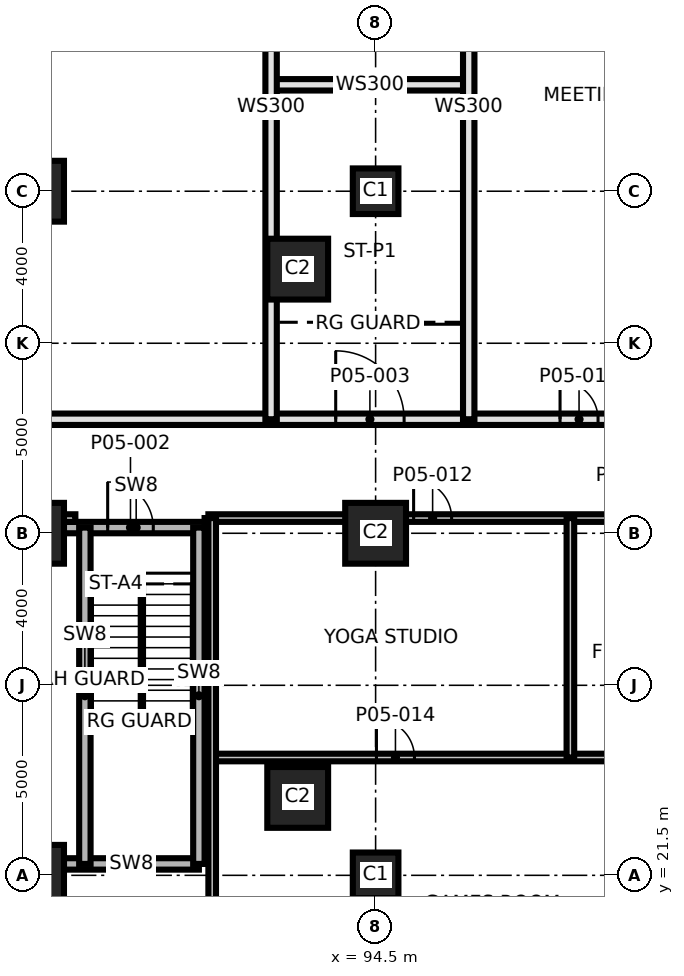
"""IFC4 building model, lengths in metres.
Left out: names, types, materials, properties, quantities, classifications, styles, units other than length and angle.
Written with IfcOpenShell. Run it as: python <this file> out.ifc"""

import sys

from ifc_helpers import new_model, si_unit, direction, frame, frame_2d, origin, origin_2d, place, context, subcontext, project, spatial, rectangle, extrude, element, fill, save


model = new_model("IFC4")
c1 = context("Model", 3, precision=1e-05, world=origin(), true_north=direction((0.0, 1.0)))
c2 = subcontext(c1, "Body", "Model", "MODEL_VIEW")
j1 = project(units=[si_unit("LENGTHUNIT", "METRE"), si_unit("PLANEANGLEUNIT", "RADIAN")], contexts=[c1])
p1 = place(None, origin())
s1 = spatial("IfcSite", under=j1, at=p1, CompositionType="ELEMENT")
p2 = place(p1, origin())
s2 = spatial("IfcBuilding", under=s1, at=p2, CompositionType="ELEMENT")
p3 = place(p2, frame((0.0, 0.0, 28.5)))
s3 = spatial("IfcBuildingStorey", under=s2, at=p3, CompositionType="ELEMENT", Elevation=28.5)
p4 = place(p3, frame((85.5, 21.5, 0.0), z_axis=(0.0, 0.0, 1.0), x_axis=(1.0, 0.0, 0.0)))
e1 = element("IfcColumn", 1, at=p4, inside=s3, PredefinedType="COLUMN", context=c2, shape_type="SweptSolid", body=[
    extrude(rectangle(XDim=1.6, YDim=1.6, at=origin_2d()), origin(), (0.0, 0.0, 1.0), 5.0),
])
p5 = place(p3, frame((94.5, 21.5, 0.0), z_axis=(0.0, 0.0, 1.0), x_axis=(1.0, 0.0, 0.0)))
e2 = element("IfcColumn", 2, at=p5, inside=s3, PredefinedType="COLUMN", context=c2, shape_type="SweptSolid", body=[
    extrude(rectangle(XDim=1.2, YDim=1.2, at=origin_2d()), origin(), (0.0, 0.0, 1.0), 5.0),
])
for number, where, z_axis, x_axis in (
    (3, (85.5, 30.5, 0.0), (0.0, 0.0, 1.0), (1.0, 0.0, 0.0)),
    (4, (94.5, 30.5, 0.0), (0.0, 0.0, 1.0), (1.0, 0.0, 0.0)),
    (5, (85.5, 39.5, 0.0), (0.0, 0.0, 1.0), (1.0, 0.0, 0.0)),
):
    element("IfcColumn", number, at=place(p3, frame(where, z_axis=z_axis, x_axis=x_axis)), inside=s3, PredefinedType="COLUMN", context=c2, shape_type="SweptSolid", body=[
        extrude(rectangle(XDim=1.6, YDim=1.6, at=origin_2d()), origin(), (0.0, 0.0, 1.0), 5.0),
    ])
p6 = place(p3, frame((94.5, 39.5, 0.0), z_axis=(0.0, 0.0, 1.0), x_axis=(1.0, 0.0, 0.0)))
e6 = element("IfcColumn", 6, at=p6, inside=s3, PredefinedType="COLUMN", context=c2, shape_type="SweptSolid", body=[
    extrude(rectangle(XDim=1.2, YDim=1.2, at=origin_2d()), origin(), (0.0, 0.0, 1.0), 5.0),
])
for number, where, z_axis, x_axis in (
    (7, (92.45, 23.55, 0.0), (0.0, 0.0, 1.0), (1.0, 0.0, 0.0)),
    (8, (92.45, 37.45, 0.0), (0.0, 0.0, 1.0), (1.0, 0.0, 0.0)),
):
    element("IfcColumn", number, at=place(p3, frame(where, z_axis=z_axis, x_axis=x_axis)), inside=s3, PredefinedType="COLUMN", context=c2, shape_type="SweptSolid", body=[
        extrude(rectangle(XDim=1.6, YDim=1.6, at=origin_2d()), origin(), (0.0, 0.0, 1.0), 5.0),
    ])
p7 = place(p3, frame((86.3, 21.8, 0.0), z_axis=(0.0, 0.0, 1.0), x_axis=(1.0, 0.0, 0.0)))
e9 = element("IfcWall", 9, at=p7, inside=s3, PredefinedType="SHEAR", context=c2, shape_type="SweptSolid", body=[
    extrude(rectangle(XDim=3.55, YDim=0.3, at=frame_2d((1.775, 0.0))), origin(), (0.0, 0.0, 1.0), 4.7),
])
p8 = place(p3, frame((90.2, 24.6, 0.0), z_axis=(0.0, 0.0, 1.0), x_axis=(1.0, 0.0, 0.0)))
e10 = element("IfcWall", 10, at=p8, inside=s3, PredefinedType="PARTITIONING", context=c2, shape_type="SweptSolid", body=[
    extrude(rectangle(XDim=14.73, YDim=0.2, at=frame_2d((7.365, 0.0))), origin(), (0.0, 0.0, 1.0), 4.7),
])
p9 = place(p8, frame((4.322, 0.0, 0.0)))
e11 = element("IfcOpeningElement", 11, at=p9, cuts=e10, PredefinedType="OPENING", context=c2, shape_type="SweptSolid", body=[
    extrude(rectangle(XDim=1.0, YDim=2.1, at=frame_2d((0.5, 1.05))), frame((0.0, 0.11, 0.0), z_axis=(0.0, -1.0, 0.0), x_axis=(1.0, 0.0, 0.0)), (0.0, 0.0, 1.0), 0.22),
])
p10 = place(p3, frame((86.3, 30.65, 0.0), z_axis=(0.0, 0.0, 1.0), x_axis=(1.0, 0.0, 0.0)))
e12 = element("IfcWall", 12, at=p10, inside=s3, PredefinedType="SHEAR", context=c2, shape_type="SweptSolid", body=[
    extrude(rectangle(XDim=3.8, YDim=0.3, at=frame_2d((1.9, 0.0))), origin(), (0.0, 0.0, 1.0), 4.7),
])
p11 = place(p10, frame((1.15, 0.0, 0.0)))
e13 = element("IfcOpeningElement", 13, at=p11, cuts=e12, PredefinedType="OPENING", context=c2, shape_type="SweptSolid", body=[
    extrude(rectangle(XDim=1.2, YDim=2.1, at=frame_2d((0.6, 1.05))), frame((0.0, 0.16, 0.0), z_axis=(0.0, -1.0, 0.0), x_axis=(1.0, 0.0, 0.0)), (0.0, 0.0, 1.0), 0.32),
])
p12 = place(p3, frame((84.6, 30.9, 0.0), z_axis=(0.0, 0.0, 1.0), x_axis=(1.0, 0.0, 0.0)))
e14 = element("IfcWall", 14, at=p12, inside=s3, PredefinedType="PARTITIONING", context=c2, shape_type="SweptSolid", body=[
    extrude(rectangle(XDim=2.0, YDim=0.2, at=frame_2d((1.0, 0.0))), origin(), (0.0, 0.0, 1.0), 4.7),
])
p13 = place(p3, frame((90.1, 30.9, 0.0), z_axis=(0.0, 0.0, 1.0), x_axis=(1.0, 0.0, 0.0)))
e15 = element("IfcWall", 15, at=p13, inside=s3, PredefinedType="PARTITIONING", context=c2, shape_type="SweptSolid", body=[
    extrude(rectangle(XDim=14.83, YDim=0.2, at=frame_2d((7.415, 0.0))), origin(), (0.0, 0.0, 1.0), 2.7),
])
p14 = place(p13, frame((5.4, 0.0, 0.0)))
e16 = element("IfcOpeningElement", 16, at=p14, cuts=e15, PredefinedType="OPENING", context=c2, shape_type="SweptSolid", body=[
    extrude(rectangle(XDim=1.0, YDim=2.1, at=frame_2d((0.5, 1.05))), frame((0.0, 0.11, 0.0), z_axis=(0.0, -1.0, 0.0), x_axis=(1.0, 0.0, 0.0)), (0.0, 0.0, 1.0), 0.22),
])
p15 = place(p13, frame((10.742, 0.0, 0.0)))
e17 = element("IfcOpeningElement", 17, at=p15, cuts=e15, PredefinedType="OPENING", context=c2, shape_type="SweptSolid", body=[
    extrude(rectangle(XDim=1.0, YDim=2.1, at=frame_2d((0.5, 1.05))), frame((0.0, 0.11, 0.0), z_axis=(0.0, -1.0, 0.0), x_axis=(1.0, 0.0, 0.0)), (0.0, 0.0, 1.0), 0.22),
])
p16 = place(p3, frame((61.5, 33.5, 0.0), z_axis=(0.0, 0.0, 1.0), x_axis=(1.0, 0.0, 0.0)))
e18 = element("IfcWall", 18, at=p16, inside=s3, PredefinedType="SOLIDWALL", context=c2, shape_type="SweptSolid", body=[
    extrude(rectangle(XDim=41.3, YDim=0.3, at=frame_2d((20.65, 0.0))), origin(), (0.0, 0.0, 1.0), 4.7),
])
p17 = place(p16, frame((31.95, 0.0, 0.0)))
e19 = element("IfcOpeningElement", 19, at=p17, cuts=e18, PredefinedType="OPENING", context=c2, shape_type="SweptSolid", body=[
    extrude(rectangle(XDim=1.8, YDim=2.1, at=frame_2d((0.9, 1.05))), frame((0.0, 0.16, 0.0), z_axis=(0.0, -1.0, 0.0), x_axis=(1.0, 0.0, 0.0)), (0.0, 0.0, 1.0), 0.32),
])
p18 = place(p16, frame((0.2, 0.0, 0.0)))
e20 = element("IfcOpeningElement", 20, at=p18, cuts=e18, PredefinedType="OPENING", context=c2, shape_type="SweptSolid", body=[
    extrude(rectangle(XDim=1.6, YDim=2.1, at=frame_2d((0.8, 1.05))), frame((0.0, 0.16, 0.0), z_axis=(0.0, -1.0, 0.0), x_axis=(1.0, 0.0, 0.0)), (0.0, 0.0, 1.0), 0.32),
])
p19 = place(p16, frame((21.144, 0.0, 0.0)))
e21 = element("IfcOpeningElement", 21, at=p19, cuts=e18, PredefinedType="OPENING", context=c2, shape_type="SweptSolid", body=[
    extrude(rectangle(XDim=1.0, YDim=2.1, at=frame_2d((0.5, 1.05))), frame((0.0, 0.16, 0.0), z_axis=(0.0, -1.0, 0.0), x_axis=(1.0, 0.0, 0.0)), (0.0, 0.0, 1.0), 0.32),
])
p20 = place(p16, frame((37.853, 0.0, 0.0)))
e22 = element("IfcOpeningElement", 22, at=p20, cuts=e18, PredefinedType="OPENING", context=c2, shape_type="SweptSolid", body=[
    extrude(rectangle(XDim=1.0, YDim=2.1, at=frame_2d((0.5, 1.05))), frame((0.0, 0.16, 0.0), z_axis=(0.0, -1.0, 0.0), x_axis=(1.0, 0.0, 0.0)), (0.0, 0.0, 1.0), 0.32),
])
p21 = place(p3, frame((91.75, 42.3, 0.0), z_axis=(0.0, 0.0, 1.0), x_axis=(1.0, 0.0, 0.0)))
e23 = element("IfcWall", 23, at=p21, inside=s3, PredefinedType="SOLIDWALL", context=c2, shape_type="SweptSolid", body=[
    extrude(rectangle(XDim=5.2, YDim=0.3, at=frame_2d((2.6, 0.0))), origin(), (0.0, 0.0, 1.0), 4.7),
])
for number, where, z_axis, x_axis in (
    (24, (86.85, 21.8, 0.0), (0.0, 0.0, 1.0), (0.0, 1.0, 0.0)),
    (25, (89.85, 21.8, 0.0), (0.0, 0.0, 1.0), (0.0, 1.0, 0.0)),
):
    element("IfcWall", number, at=place(p3, frame(where, z_axis=z_axis, x_axis=x_axis)), inside=s3, PredefinedType="SHEAR", context=c2, shape_type="SweptSolid", body=[
        extrude(rectangle(XDim=8.85, YDim=0.3, at=frame_2d((4.425, 0.0))), origin(), (0.0, 0.0, 1.0), 4.7),
    ])
p22 = place(p3, frame((90.1, 30.65, 0.0), z_axis=(0.0, 0.0, 1.0), x_axis=(0.0, 1.0, 0.0)))
e26 = element("IfcWall", 26, at=p22, inside=s3, PredefinedType="PARTITIONING", context=c2, shape_type="SweptSolid", body=[
    extrude(rectangle(XDim=0.25, YDim=0.2, at=frame_2d((0.125, 0.0))), origin(), (0.0, 0.0, 1.0), 4.7),
])
p23 = place(p3, frame((90.2, 11.07, 0.0), z_axis=(0.0, 0.0, 1.0), x_axis=(0.0, 1.0, 0.0)))
e27 = element("IfcWall", 27, at=p23, inside=s3, PredefinedType="PARTITIONING", context=c2, shape_type="SweptSolid", body=[
    extrude(rectangle(XDim=19.83, YDim=0.2, at=frame_2d((9.915, 0.0))), origin(), (0.0, 0.0, 1.0), 4.7),
])
for number, where, z_axis, x_axis in (
    (28, (91.75, 33.5, 0.0), (0.0, 0.0, 1.0), (0.0, 1.0, 0.0)),
    (29, (96.95, 33.5, 0.0), (0.0, 0.0, 1.0), (0.0, 1.0, 0.0)),
):
    element("IfcWall", number, at=place(p3, frame(where, z_axis=z_axis, x_axis=x_axis)), inside=s3, PredefinedType="SOLIDWALL", context=c2, shape_type="SweptSolid", body=[
        extrude(rectangle(XDim=16.43, YDim=0.3, at=frame_2d((8.215, 0.0))), origin(), (0.0, 0.0, 1.0), 4.7),
    ])
p24 = place(p3, frame((99.625, 24.6, 0.0), z_axis=(0.0, 0.0, 1.0), x_axis=(0.0, 1.0, 0.0)))
e30 = element("IfcWall", 30, at=p24, inside=s3, PredefinedType="PARTITIONING", context=c2, shape_type="SweptSolid", body=[
    extrude(rectangle(XDim=6.3, YDim=0.2, at=frame_2d((3.15, 0.0))), origin(), (0.0, 0.0, 1.0), 4.7),
])
p25 = place(p11, origin())
e31 = element("IfcDoor", 31, at=p25, inside=s3, OperationType="SINGLE_SWING_RIGHT", PredefinedType="DOOR", context=c2, shape_type="SweptSolid", body=[
    extrude(rectangle(XDim=1.2, YDim=2.1, at=frame_2d((0.6, 1.05))), frame((0.0, 0.025, 0.0), z_axis=(0.0, -1.0, 0.0), x_axis=(1.0, 0.0, 0.0)), (0.0, 0.0, 1.0), 0.05),
])
fill(e13, e31)
p26 = place(p17, origin())
e32 = element("IfcDoor", 32, at=p26, inside=s3, OperationType="SINGLE_SWING_LEFT", PredefinedType="DOOR", context=c2, shape_type="SweptSolid", body=[
    extrude(rectangle(XDim=1.8, YDim=2.1, at=frame_2d((0.9, 1.05))), frame((0.0, 0.025, 0.0), z_axis=(0.0, -1.0, 0.0), x_axis=(1.0, 0.0, 0.0)), (0.0, 0.0, 1.0), 0.05),
])
fill(e19, e32)
p27 = place(p14, origin())
e33 = element("IfcDoor", 33, at=p27, inside=s3, OperationType="SINGLE_SWING_RIGHT", PredefinedType="DOOR", context=c2, shape_type="SweptSolid", body=[
    extrude(rectangle(XDim=1.0, YDim=2.1, at=frame_2d((0.5, 1.05))), frame((0.0, 0.025, 0.0), z_axis=(0.0, -1.0, 0.0), x_axis=(1.0, 0.0, 0.0)), (0.0, 0.0, 1.0), 0.05),
])
fill(e16, e33)
p28 = place(p9, origin())
e34 = element("IfcDoor", 34, at=p28, inside=s3, OperationType="SINGLE_SWING_RIGHT", PredefinedType="DOOR", context=c2, shape_type="SweptSolid", body=[
    extrude(rectangle(XDim=1.0, YDim=2.1, at=frame_2d((0.5, 1.05))), frame((0.0, 0.025, 0.0), z_axis=(0.0, -1.0, 0.0), x_axis=(1.0, 0.0, 0.0)), (0.0, 0.0, 1.0), 0.05),
])
fill(e11, e34)
p29 = place(p20, origin())
e35 = element("IfcDoor", 35, at=p29, inside=s3, OperationType="SINGLE_SWING_LEFT", PredefinedType="DOOR", context=c2, shape_type="SweptSolid", body=[
    extrude(rectangle(XDim=1.0, YDim=2.1, at=frame_2d((0.5, 1.05))), frame((0.0, 0.025, 0.0), z_axis=(0.0, -1.0, 0.0), x_axis=(1.0, 0.0, 0.0)), (0.0, 0.0, 1.0), 0.05),
])
fill(e22, e35)
save(model, sys.argv[1])
